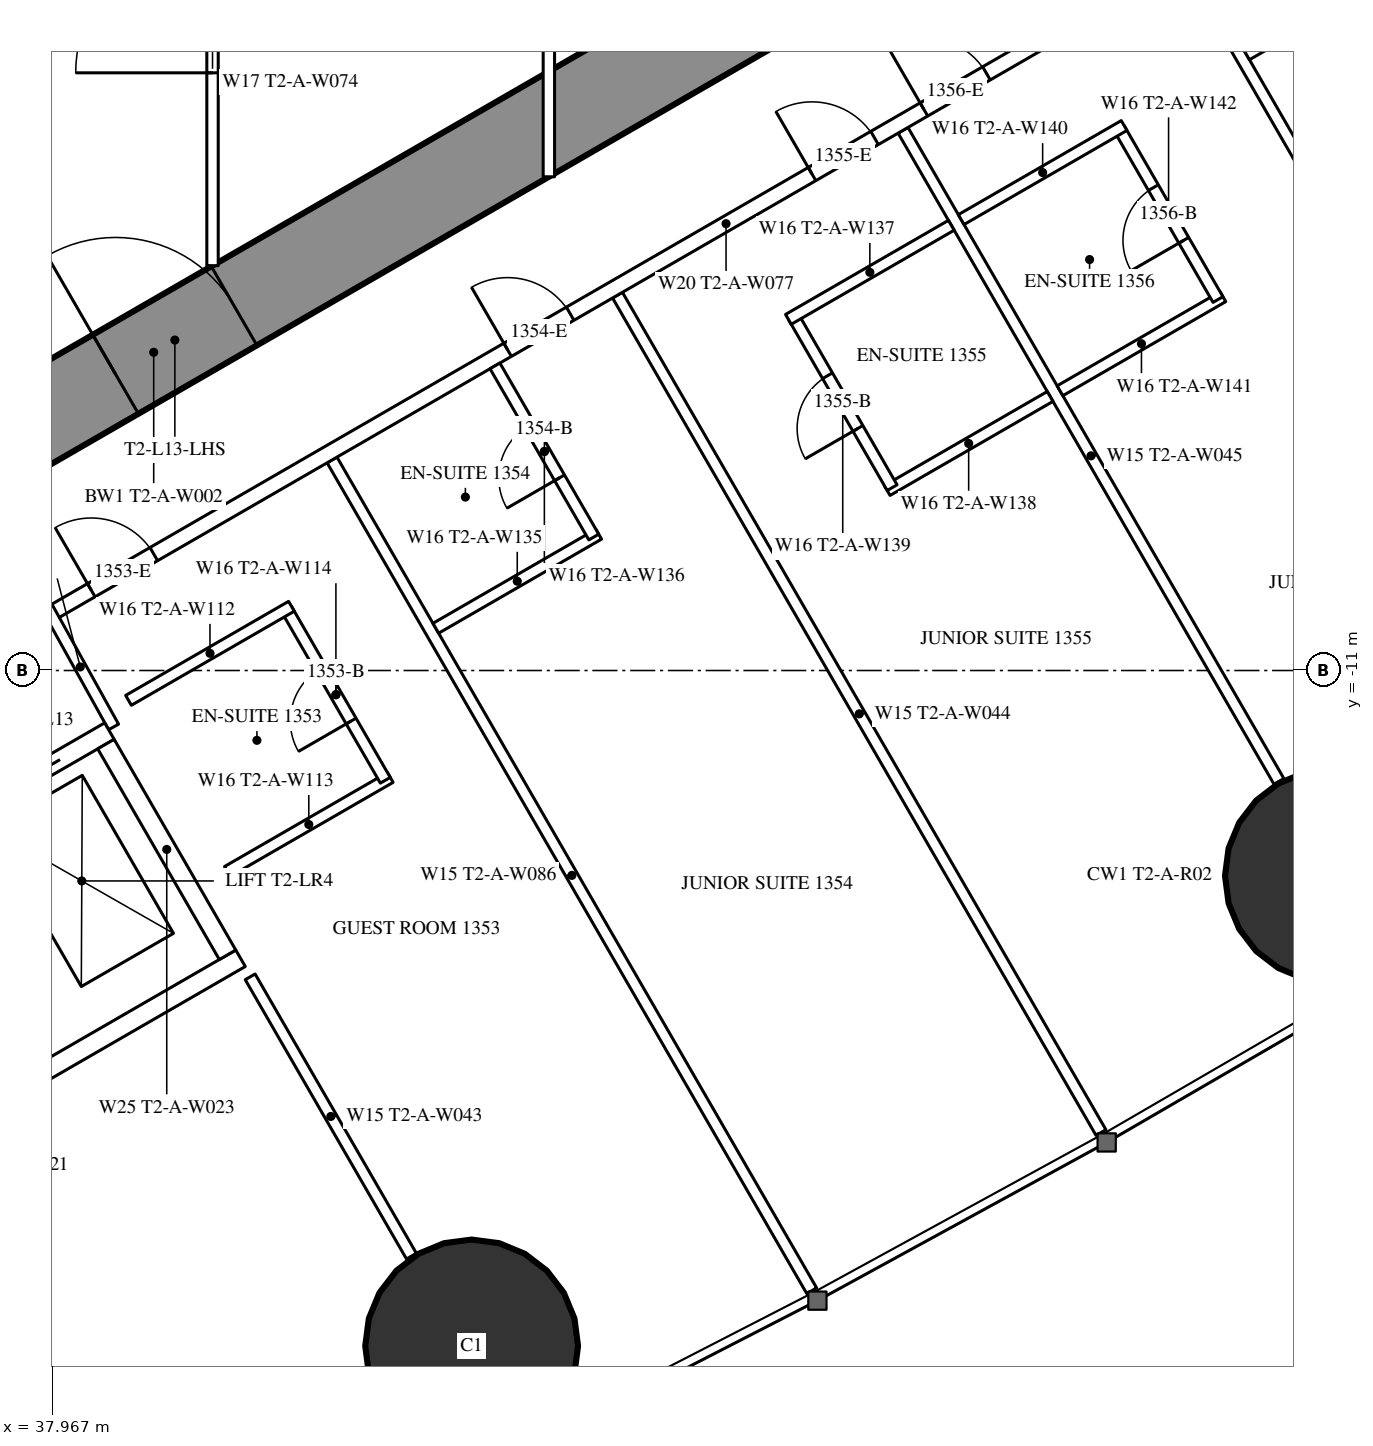
"""IFC4 building model, lengths in metres.
Left out: names, types, materials, properties, quantities, classifications, styles, units other than length and angle.
Written with IfcOpenShell. Run it as: python <this file> out.ifc"""

import sys

from ifc_helpers import new_model, si_unit, direction, frame, frame_2d, origin, origin_2d, place, context, subcontext, project, spatial, rectangle, hollow_circle, extrude, element, fill, save


model = new_model("IFC4")
c1 = context("Model", 3, precision=1e-05, world=origin(), true_north=direction((0.0, 1.0)))
c2 = subcontext(c1, "Body", "Model", "MODEL_VIEW")
j1 = project(units=[si_unit("LENGTHUNIT", "METRE"), si_unit("PLANEANGLEUNIT", "RADIAN")], contexts=[c1])
p1 = place(None, origin())
s1 = spatial("IfcSite", under=j1, at=p1, CompositionType="ELEMENT")
p2 = place(p1, origin())
s2 = spatial("IfcBuilding", under=s1, at=p2, CompositionType="ELEMENT")
p3 = place(p2, frame((0.0, 0.0, 53.0)))
s3 = spatial("IfcBuildingStorey", under=s2, at=p3, CompositionType="ELEMENT", Elevation=53.0)
for number, where, z_axis, x_axis in (
    (1, (43.484, -19.886, 0.0), (0.0, 0.0, 1.0), (1.0, 0.0, 0.0)),
    (2, (54.795, -13.701, 0.0), (0.0, 0.0, 1.0), (1.0, 0.0, 0.0)),
):
    element("IfcColumn", number, at=place(p3, frame(where, z_axis=z_axis, x_axis=x_axis)), inside=s3, PredefinedType="COLUMN", context=c2, shape_type="SweptSolid", body=[
        extrude(hollow_circle(Radius=1.4, WallThickness=0.12, at=origin_2d()), origin(), (0.0, 0.0, 1.0), 3.5),
    ])
p4 = place(p3, frame((27.2, -13.8, 0.0), z_axis=(0.0, 0.0, 1.0), x_axis=(0.866027159892, 0.499996958321, 0.0)))
e3 = element("IfcWall", 3, at=p4, inside=s3, PredefinedType="SHEAR", context=c2, shape_type="SweptSolid", body=[
    extrude(rectangle(XDim=27.947, YDim=1.2, at=frame_2d((13.973, 0.0))), origin(), (0.0, 0.0, 1.0), 3.5),
])
p5 = place(p4, frame((4.6, 0.0, 0.0)))
e4 = element("IfcOpeningElement", 4, at=p5, cuts=e3, PredefinedType="OPENING", context=c2, shape_type="SweptSolid", body=[
    extrude(rectangle(XDim=1.0, YDim=2.2, at=frame_2d((0.5, 1.1))), frame((0.0, 0.61, 0.0), z_axis=(0.0, -1.0, 0.0), x_axis=(1.0, 0.0, 0.0)), (0.0, 0.0, 1.0), 1.22),
])
p6 = place(p4, frame((13.395, 0.0, 0.0)))
e5 = element("IfcOpeningElement", 5, at=p6, cuts=e3, PredefinedType="OPENING", context=c2, shape_type="SweptSolid", body=[
    extrude(rectangle(XDim=1.8, YDim=2.2, at=frame_2d((0.9, 1.1))), frame((0.0, 0.61, 0.0), z_axis=(0.0, -1.0, 0.0), x_axis=(1.0, 0.0, 0.0)), (0.0, 0.0, 1.0), 1.22),
])
p7 = place(p3, frame((41.647, -8.23, 0.0), z_axis=(0.0, 0.0, 1.0), x_axis=(0.49998590462, -0.866033541603, 0.0)))
e6 = element("IfcWall", 6, at=p7, inside=s3, PredefinedType="PARTITIONING", context=c2, shape_type="SweptSolid", body=[
    extrude(rectangle(XDim=12.621, YDim=0.15, at=frame_2d((6.311, 0.0))), origin(), (0.0, 0.0, 1.0), 3.25),
])
p8 = place(p3, frame((45.403, -6.062, 0.0), z_axis=(0.0, 0.0, 1.0), x_axis=(0.500007077968, -0.866021317279, 0.0)))
e7 = element("IfcWall", 7, at=p8, inside=s3, PredefinedType="PARTITIONING", context=c2, shape_type="SweptSolid", body=[
    extrude(rectangle(XDim=12.721, YDim=0.15, at=frame_2d((6.361, 0.0))), origin(), (0.0, 0.0, 1.0), 3.25),
])
p9 = place(p3, frame((49.159, -3.893, 0.0), z_axis=(0.0, 0.0, 1.0), x_axis=(0.499998773722, -0.866026111775, 0.0)))
e8 = element("IfcWall", 8, at=p9, inside=s3, PredefinedType="PARTITIONING", context=c2, shape_type="SweptSolid", body=[
    extrude(rectangle(XDim=9.892, YDim=0.15, at=frame_2d((4.946, 0.0))), origin(), (0.0, 0.0, 1.0), 2.25),
])
p10 = place(p3, frame((52.915, -1.725, 0.0), z_axis=(0.0, 0.0, 1.0), x_axis=(0.499997163113, -0.866027041656, 0.0)))
e9 = element("IfcWall", 9, at=p10, inside=s3, PredefinedType="PARTITIONING", context=c2, shape_type="SweptSolid", body=[
    extrude(rectangle(XDim=12.591, YDim=0.15, at=frame_2d((6.295, 0.0))), origin(), (0.0, 0.0, 1.0), 3.25),
])
p11 = place(p3, frame((40.57, -15.03, 0.0), z_axis=(0.0, 0.0, 1.0), x_axis=(0.500012993597, -0.866017901798, 0.0)))
e10 = element("IfcWall", 10, at=p11, inside=s3, PredefinedType="PARTITIONING", context=c2, shape_type="SweptSolid", body=[
    extrude(rectangle(XDim=4.243, YDim=0.15, at=frame_2d((2.122, 0.0))), origin(), (0.0, 0.0, 1.0), 3.25),
])
p12 = place(p3, frame((37.96, -10.243, 0.0), z_axis=(0.0, 0.0, 1.0), x_axis=(0.866026429433, 0.499998223521, 0.0)))
e11 = element("IfcWall", 11, at=p12, inside=s3, PredefinedType="PARTITIONING", context=c2, shape_type="SweptSolid", body=[
    extrude(rectangle(XDim=20.487, YDim=0.2, at=frame_2d((10.243, 0.0))), origin(), (0.0, 0.0, 1.0), 3.25),
])
p13 = place(p12, frame((6.925, 0.0, 0.0)))
e12 = element("IfcOpeningElement", 12, at=p13, cuts=e11, PredefinedType="OPENING", context=c2, shape_type="SweptSolid", body=[
    extrude(rectangle(XDim=0.95, YDim=2.2, at=frame_2d((0.475, 1.1))), frame((0.0, 0.11, 0.0), z_axis=(0.0, -1.0, 0.0), x_axis=(1.0, 0.0, 0.0)), (0.0, 0.0, 1.0), 0.22),
])
p14 = place(p12, frame((11.549, 0.0, 0.0)))
e13 = element("IfcOpeningElement", 13, at=p14, cuts=e11, PredefinedType="OPENING", context=c2, shape_type="SweptSolid", body=[
    extrude(rectangle(XDim=0.95, YDim=2.2, at=frame_2d((0.475, 1.1))), frame((0.0, 0.11, 0.0), z_axis=(0.0, -1.0, 0.0), x_axis=(1.0, 0.0, 0.0)), (0.0, 0.0, 1.0), 0.22),
])
p15 = place(p12, frame((13.249, 0.0, 0.0)))
e14 = element("IfcOpeningElement", 14, at=p15, cuts=e11, PredefinedType="OPENING", context=c2, shape_type="SweptSolid", body=[
    extrude(rectangle(XDim=0.95, YDim=2.2, at=frame_2d((0.475, 1.1))), frame((0.0, 0.11, 0.0), z_axis=(0.0, -1.0, 0.0), x_axis=(1.0, 0.0, 0.0)), (0.0, 0.0, 1.0), 0.22),
])
p16 = place(p12, frame((17.585, 0.0, 0.0)))
e15 = element("IfcOpeningElement", 15, at=p16, cuts=e11, PredefinedType="OPENING", context=c2, shape_type="SweptSolid", body=[
    extrude(rectangle(XDim=0.95, YDim=2.2, at=frame_2d((0.475, 1.1))), frame((0.0, 0.11, 0.0), z_axis=(0.0, -1.0, 0.0), x_axis=(1.0, 0.0, 0.0)), (0.0, 0.0, 1.0), 0.22),
])
p17 = place(p12, frame((0.6, 0.0, 0.0)))
e16 = element("IfcOpeningElement", 16, at=p17, cuts=e11, PredefinedType="OPENING", context=c2, shape_type="SweptSolid", body=[
    extrude(rectangle(XDim=0.95, YDim=2.2, at=frame_2d((0.475, 1.1))), frame((0.0, 0.11, 0.0), z_axis=(0.0, -1.0, 0.0), x_axis=(1.0, 0.0, 0.0)), (0.0, 0.0, 1.0), 0.22),
])
p18 = place(p3, frame((38.773, -11.742, 0.0), z_axis=(0.0, 0.0, 1.0), x_axis=(-0.485528096672, 0.8742210632, 0.0)))
e17 = element("IfcWall", 17, at=p18, inside=s3, PredefinedType="PARTITIONING", context=c2, shape_type="SweptSolid", body=[
    extrude(rectangle(XDim=1.805, YDim=0.15, at=frame_2d((0.903, 0.0))), origin(), (0.0, 0.0, 1.0), 3.25),
])
p19 = place(p3, frame((43.012, -10.444, 0.0), z_axis=(0.0, 0.0, 1.0), x_axis=(0.866031185235, 0.4999899861, 0.0)))
e18 = element("IfcWall", 18, at=p19, inside=s3, PredefinedType="PARTITIONING", context=c2, shape_type="SweptSolid", body=[
    extrude(rectangle(XDim=2.475, YDim=0.15, at=frame_2d((1.238, 0.0))), origin(), (0.0, 0.0, 1.0), 3.25),
])
p20 = place(p3, frame((43.791, -6.993, 0.0), z_axis=(0.0, 0.0, 1.0), x_axis=(0.500047596559, -0.865997922154, 0.0)))
e19 = element("IfcWall", 19, at=p20, inside=s3, PredefinedType="PARTITIONING", context=c2, shape_type="SweptSolid", body=[
    extrude(rectangle(XDim=2.6, YDim=0.15, at=frame_2d((1.3, 0.0))), origin(), (0.0, 0.0, 1.0), 3.25),
])
p21 = place(p20, frame((0.9, 0.0, 0.0)))
e20 = element("IfcOpeningElement", 20, at=p21, cuts=e19, PredefinedType="OPENING", context=c2, shape_type="SweptSolid", body=[
    extrude(rectangle(XDim=0.8, YDim=2.2, at=frame_2d((0.4, 1.1))), frame((0.0, 0.085, 0.0), z_axis=(0.0, -1.0, 0.0), x_axis=(1.0, 0.0, 0.0)), (0.0, 0.0, 1.0), 0.17),
])
p22 = place(p3, frame((48.951, -8.632, 0.0), z_axis=(0.0, 0.0, 1.0), x_axis=(0.866006523861, 0.500032699561, 0.0)))
e21 = element("IfcWall", 21, at=p22, inside=s3, PredefinedType="PARTITIONING", context=c2, shape_type="SweptSolid", body=[
    extrude(rectangle(XDim=2.475, YDim=0.15, at=frame_2d((1.237, 0.0))), origin(), (0.0, 0.0, 1.0), 3.25),
])
p23 = place(p3, frame((47.716, -6.343, 0.0), z_axis=(0.0, 0.0, 1.0), x_axis=(0.500006934395, -0.866021400173, 0.0)))
e22 = element("IfcWall", 22, at=p23, inside=s3, PredefinedType="PARTITIONING", context=c2, shape_type="SweptSolid", body=[
    extrude(rectangle(XDim=2.6, YDim=0.15, at=frame_2d((1.3, 0.0))), origin(), (0.0, 0.0, 1.0), 3.25),
])
p24 = place(p23, frame((0.9, 0.0, 0.0)))
e23 = element("IfcOpeningElement", 23, at=p24, cuts=e22, PredefinedType="OPENING", context=c2, shape_type="SweptSolid", body=[
    extrude(rectangle(XDim=0.8, YDim=2.2, at=frame_2d((0.4, 1.1))), frame((0.0, 0.085, 0.0), z_axis=(0.0, -1.0, 0.0), x_axis=(1.0, 0.0, 0.0)), (0.0, 0.0, 1.0), 0.17),
])
for number, where, z_axis, x_axis in (
    (24, (47.651, -6.38, 0.0), (0.0, 0.0, 1.0), (0.866, 0.5, 0.0)),
    (25, (51.224, -7.32, 0.0), (0.0, 0.0, 1.0), (0.866, 0.5, 0.0)),
):
    element("IfcWall", number, at=place(p3, frame(where, z_axis=z_axis, x_axis=x_axis)), inside=s3, PredefinedType="PARTITIONING", context=c2, shape_type="SweptSolid", body=[
        extrude(rectangle(XDim=2.475, YDim=0.15, at=frame_2d((1.238, 0.0))), origin(), (0.0, 0.0, 1.0), 3.25),
    ])
p25 = place(p3, frame((52.003, -3.868, 0.0), z_axis=(0.0, 0.0, 1.0), x_axis=(0.500047596559, -0.865997922154, 0.0)))
e26 = element("IfcWall", 26, at=p25, inside=s3, PredefinedType="PARTITIONING", context=c2, shape_type="SweptSolid", body=[
    extrude(rectangle(XDim=2.6, YDim=0.15, at=frame_2d((1.3, 0.0))), origin(), (0.0, 0.0, 1.0), 3.25),
])
p26 = place(p25, frame((0.9, 0.0, 0.0)))
e27 = element("IfcOpeningElement", 27, at=p26, cuts=e26, PredefinedType="OPENING", context=c2, shape_type="SweptSolid", body=[
    extrude(rectangle(XDim=0.8, YDim=2.2, at=frame_2d((0.4, 1.1))), frame((0.0, 0.085, 0.0), z_axis=(0.0, -1.0, 0.0), x_axis=(1.0, 0.0, 0.0)), (0.0, 0.0, 1.0), 0.17),
])
for number, where, z_axis, x_axis in (
    (28, (49.925, -5.068, 0.0), (0.0, 0.0, 1.0), (0.866, 0.5, 0.0)),
    (29, (53.68, -2.9, 0.0), (0.0, 0.0, 1.0), (0.866, 0.5, 0.0)),
):
    element("IfcWall", number, at=place(p3, frame(where, z_axis=z_axis, x_axis=x_axis)), inside=s3, PredefinedType="PARTITIONING", context=c2, shape_type="SweptSolid", body=[
        extrude(rectangle(XDim=2.475, YDim=0.15, at=frame_2d((1.237, 0.0))), origin(), (0.0, 0.0, 1.0), 3.25),
    ])
p27 = place(p3, frame((40.27, -13.644, 0.0), z_axis=(0.0, 0.0, 1.0), x_axis=(0.866031185235, 0.4999899861, 0.0)))
e30 = element("IfcWall", 30, at=p27, inside=s3, PredefinedType="PARTITIONING", context=c2, shape_type="SweptSolid", body=[
    extrude(rectangle(XDim=2.475, YDim=0.15, at=frame_2d((1.238, 0.0))), origin(), (0.0, 0.0, 1.0), 3.25),
])
p28 = place(p3, frame((41.048, -10.193, 0.0), z_axis=(0.0, 0.0, 1.0), x_axis=(0.500047596559, -0.865997922154, 0.0)))
e31 = element("IfcWall", 31, at=p28, inside=s3, PredefinedType="PARTITIONING", context=c2, shape_type="SweptSolid", body=[
    extrude(rectangle(XDim=2.6, YDim=0.15, at=frame_2d((1.3, 0.0))), origin(), (0.0, 0.0, 1.0), 3.25),
])
p29 = place(p28, frame((0.9, 0.0, 0.0)))
e32 = element("IfcOpeningElement", 32, at=p29, cuts=e31, PredefinedType="OPENING", context=c2, shape_type="SweptSolid", body=[
    extrude(rectangle(XDim=0.8, YDim=2.2, at=frame_2d((0.4, 1.1))), frame((0.0, 0.085, 0.0), z_axis=(0.0, -1.0, 0.0), x_axis=(1.0, 0.0, 0.0)), (0.0, 0.0, 1.0), 0.17),
])
p30 = place(p3, frame((38.97, -11.393, 0.0), z_axis=(0.0, 0.0, 1.0), x_axis=(0.866031185235, 0.4999899861, 0.0)))
e33 = element("IfcWall", 33, at=p30, inside=s3, PredefinedType="PARTITIONING", context=c2, shape_type="SweptSolid", body=[
    extrude(rectangle(XDim=2.475, YDim=0.15, at=frame_2d((1.238, 0.0))), origin(), (0.0, 0.0, 1.0), 3.25),
])
p31 = place(p3, frame((40.075, -5.674, 0.0), z_axis=(0.0, 0.0, 1.0), x_axis=(0.0, 1.0, 0.0)))
e34 = element("IfcWall", 34, at=p31, inside=s3, PredefinedType="PARTITIONING", context=c2, shape_type="SweptSolid", body=[
    extrude(rectangle(XDim=6.874, YDim=0.15, at=frame_2d((3.437, 0.0))), origin(), (0.0, 0.0, 1.0), 3.25),
])
p32 = place(p31, frame((2.537, 0.0, 0.0)))
e35 = element("IfcOpeningElement", 35, at=p32, cuts=e34, PredefinedType="OPENING", context=c2, shape_type="SweptSolid", body=[
    extrude(rectangle(XDim=1.8, YDim=2.2, at=frame_2d((0.9, 1.1))), frame((0.0, 0.085, 0.0), z_axis=(0.0, -1.0, 0.0), x_axis=(1.0, 0.0, 0.0)), (0.0, 0.0, 1.0), 0.17),
])
p33 = place(p3, frame((44.5, -4.505, 0.0), z_axis=(0.0, 0.0, 1.0), x_axis=(0.0, 1.0, 0.0)))
e36 = element("IfcWall", 36, at=p33, inside=s3, PredefinedType="PARTITIONING", context=c2, shape_type="SweptSolid", body=[
    extrude(rectangle(XDim=9.009, YDim=0.15, at=frame_2d((4.505, 0.0))), origin(), (0.0, 0.0, 1.0), 2.45),
])
p34 = place(p33, frame((1.752, 0.0, 0.0)))
e37 = element("IfcOpeningElement", 37, at=p34, cuts=e36, PredefinedType="OPENING", context=c2, shape_type="SweptSolid", body=[
    extrude(rectangle(XDim=1.0, YDim=2.2, at=frame_2d((0.5, 1.1))), frame((0.0, 0.085, 0.0), z_axis=(0.0, -1.0, 0.0), x_axis=(1.0, 0.0, 0.0)), (0.0, 0.0, 1.0), 0.17),
])
p35 = place(p33, frame((6.257, 0.0, 0.0)))
e38 = element("IfcOpeningElement", 38, at=p35, cuts=e36, PredefinedType="OPENING", context=c2, shape_type="SweptSolid", body=[
    extrude(rectangle(XDim=1.0, YDim=2.2, at=frame_2d((0.5, 1.1))), frame((0.0, 0.085, 0.0), z_axis=(0.0, -1.0, 0.0), x_axis=(1.0, 0.0, 0.0)), (0.0, 0.0, 1.0), 0.17),
])
p36 = place(p3, frame((31.271, -16.097, 0.0), z_axis=(0.0, 0.0, 1.0), x_axis=(0.86604045752, 0.499973925258, 0.0)))
e39 = element("IfcWall", 39, at=p36, inside=s3, PredefinedType="PARTITIONING", context=c2, shape_type="SweptSolid", body=[
    extrude(rectangle(XDim=8.6, YDim=0.25, at=frame_2d((4.3, 0.0))), origin(), (0.0, 0.0, 1.0), 3.25),
])
p37 = place(p36, frame((0.75, 0.0, 0.0)))
e40 = element("IfcOpeningElement", 40, at=p37, cuts=e39, PredefinedType="OPENING", context=c2, shape_type="SweptSolid", body=[
    extrude(rectangle(XDim=1.1, YDim=2.2, at=frame_2d((0.55, 1.1))), frame((0.0, 0.135, 0.0), z_axis=(0.0, -1.0, 0.0), x_axis=(1.0, 0.0, 0.0)), (0.0, 0.0, 1.0), 0.27),
])
p38 = place(p36, frame((2.75, 0.0, 0.0)))
e41 = element("IfcOpeningElement", 41, at=p38, cuts=e39, PredefinedType="OPENING", context=c2, shape_type="SweptSolid", body=[
    extrude(rectangle(XDim=1.1, YDim=2.2, at=frame_2d((0.55, 1.1))), frame((0.0, 0.135, 0.0), z_axis=(0.0, -1.0, 0.0), x_axis=(1.0, 0.0, 0.0)), (0.0, 0.0, 1.0), 0.27),
])
p39 = place(p36, frame((4.75, 0.0, 0.0)))
e42 = element("IfcOpeningElement", 42, at=p39, cuts=e39, PredefinedType="OPENING", context=c2, shape_type="SweptSolid", body=[
    extrude(rectangle(XDim=1.1, YDim=2.2, at=frame_2d((0.55, 1.1))), frame((0.0, 0.135, 0.0), z_axis=(0.0, -1.0, 0.0), x_axis=(1.0, 0.0, 0.0)), (0.0, 0.0, 1.0), 0.27),
])
p40 = place(p36, frame((6.75, 0.0, 0.0)))
e43 = element("IfcOpeningElement", 43, at=p40, cuts=e39, PredefinedType="OPENING", context=c2, shape_type="SweptSolid", body=[
    extrude(rectangle(XDim=1.1, YDim=2.2, at=frame_2d((0.55, 1.1))), frame((0.0, 0.135, 0.0), z_axis=(0.0, -1.0, 0.0), x_axis=(1.0, 0.0, 0.0)), (0.0, 0.0, 1.0), 0.27),
])
p41 = place(p3, frame((32.996, -19.086, 0.0), z_axis=(0.0, 0.0, 1.0), x_axis=(0.866028165386, 0.499995216735, 0.0)))
e44 = element("IfcWall", 44, at=p41, inside=s3, PredefinedType="PARTITIONING", context=c2, shape_type="SweptSolid", body=[
    extrude(rectangle(XDim=8.6, YDim=0.25, at=frame_2d((4.3, 0.0))), origin(), (0.0, 0.0, 1.0), 3.25),
])
p42 = place(p3, frame((38.673, -11.968, 0.0), z_axis=(0.0, 0.0, 1.0), x_axis=(0.499929347863, -0.866066190972, 0.0)))
e45 = element("IfcWall", 45, at=p42, inside=s3, PredefinedType="PARTITIONING", context=c2, shape_type="SweptSolid", body=[
    extrude(rectangle(XDim=3.201, YDim=0.25, at=frame_2d((1.6, 0.0))), origin(), (0.0, 0.0, 1.0), 3.25),
])
p43 = place(p21, origin())
e46 = element("IfcDoor", 46, at=p43, inside=s3, OperationType="SINGLE_SWING_RIGHT", PredefinedType="DOOR", context=c2, shape_type="SweptSolid", body=[
    extrude(rectangle(XDim=0.8, YDim=2.2, at=frame_2d((0.4, 1.1))), frame((0.0, 0.025, 0.0), z_axis=(0.0, -1.0, 0.0), x_axis=(1.0, 0.0, 0.0)), (0.0, 0.0, 1.0), 0.05),
])
fill(e20, e46)
p44 = place(p13, origin())
e47 = element("IfcDoor", 47, at=p44, inside=s3, OperationType="SINGLE_SWING_LEFT", PredefinedType="DOOR", context=c2, shape_type="SweptSolid", body=[
    extrude(rectangle(XDim=0.95, YDim=2.2, at=frame_2d((0.475, 1.1))), frame((0.0, 0.025, 0.0), z_axis=(0.0, -1.0, 0.0), x_axis=(1.0, 0.0, 0.0)), (0.0, 0.0, 1.0), 0.05),
])
fill(e12, e47)
p45 = place(p24, origin())
e48 = element("IfcDoor", 48, at=p45, inside=s3, OperationType="SINGLE_SWING_RIGHT", PredefinedType="DOOR", context=c2, shape_type="SweptSolid", body=[
    extrude(rectangle(XDim=0.8, YDim=2.2, at=frame_2d((0.4, 1.1))), frame((0.0, 0.025, 0.0), z_axis=(0.0, -1.0, 0.0), x_axis=(1.0, 0.0, 0.0)), (0.0, 0.0, 1.0), 0.05),
])
fill(e23, e48)
p46 = place(p14, origin())
e49 = element("IfcDoor", 49, at=p46, inside=s3, OperationType="SINGLE_SWING_LEFT", PredefinedType="DOOR", context=c2, shape_type="SweptSolid", body=[
    extrude(rectangle(XDim=0.95, YDim=2.2, at=frame_2d((0.475, 1.1))), frame((0.0, 0.025, 0.0), z_axis=(0.0, -1.0, 0.0), x_axis=(1.0, 0.0, 0.0)), (0.0, 0.0, 1.0), 0.05),
])
fill(e13, e49)
p47 = place(p26, origin())
e50 = element("IfcDoor", 50, at=p47, inside=s3, OperationType="SINGLE_SWING_RIGHT", PredefinedType="DOOR", context=c2, shape_type="SweptSolid", body=[
    extrude(rectangle(XDim=0.8, YDim=2.2, at=frame_2d((0.4, 1.1))), frame((0.0, 0.025, 0.0), z_axis=(0.0, -1.0, 0.0), x_axis=(1.0, 0.0, 0.0)), (0.0, 0.0, 1.0), 0.05),
])
fill(e27, e50)
p48 = place(p15, origin())
e51 = element("IfcDoor", 51, at=p48, inside=s3, OperationType="SINGLE_SWING_LEFT", PredefinedType="DOOR", context=c2, shape_type="SweptSolid", body=[
    extrude(rectangle(XDim=0.95, YDim=2.2, at=frame_2d((0.475, 1.1))), frame((0.0, 0.025, 0.0), z_axis=(0.0, -1.0, 0.0), x_axis=(1.0, 0.0, 0.0)), (0.0, 0.0, 1.0), 0.05),
])
fill(e14, e51)
p49 = place(p29, origin())
e52 = element("IfcDoor", 52, at=p49, inside=s3, OperationType="SINGLE_SWING_RIGHT", PredefinedType="DOOR", context=c2, shape_type="SweptSolid", body=[
    extrude(rectangle(XDim=0.8, YDim=2.2, at=frame_2d((0.4, 1.1))), frame((0.0, 0.025, 0.0), z_axis=(0.0, -1.0, 0.0), x_axis=(1.0, 0.0, 0.0)), (0.0, 0.0, 1.0), 0.05),
])
fill(e32, e52)
p50 = place(p17, origin())
e53 = element("IfcDoor", 53, at=p50, inside=s3, OperationType="SINGLE_SWING_LEFT", PredefinedType="DOOR", context=c2, shape_type="SweptSolid", body=[
    extrude(rectangle(XDim=0.95, YDim=2.2, at=frame_2d((0.475, 1.1))), frame((0.0, 0.025, 0.0), z_axis=(0.0, -1.0, 0.0), x_axis=(1.0, 0.0, 0.0)), (0.0, 0.0, 1.0), 0.05),
])
fill(e16, e53)
p51 = place(p32, origin())
e54 = element("IfcDoor", 54, at=p51, inside=s3, OperationType="DOUBLE_DOOR_SINGLE_SWING", PredefinedType="DOOR", context=c2, shape_type="SweptSolid", body=[
    extrude(rectangle(XDim=1.8, YDim=2.2, at=frame_2d((0.9, 1.1))), frame((0.0, 0.025, 0.0), z_axis=(0.0, -1.0, 0.0), x_axis=(1.0, 0.0, 0.0)), (0.0, 0.0, 1.0), 0.05),
])
fill(e35, e54)
p52 = place(p6, origin())
e55 = element("IfcDoor", 55, at=p52, inside=s3, OperationType="DOUBLE_DOOR_SINGLE_SWING", PredefinedType="DOOR", context=c2, shape_type="SweptSolid", body=[
    extrude(rectangle(XDim=1.8, YDim=2.2, at=frame_2d((0.9, 1.1))), frame((0.0, 0.025, 0.0), z_axis=(0.0, -1.0, 0.0), x_axis=(1.0, 0.0, 0.0)), (0.0, 0.0, 1.0), 0.05),
])
fill(e5, e55)
p53 = place(p40, origin())
e56 = element("IfcDoor", 56, at=p53, inside=s3, OperationType="DOUBLE_DOOR_SLIDING", PredefinedType="USERDEFINED", context=c2, shape_type="SweptSolid", body=[
    extrude(rectangle(XDim=1.1, YDim=2.2, at=frame_2d((0.55, 1.1))), frame((0.0, 0.025, 0.0), z_axis=(0.0, -1.0, 0.0), x_axis=(1.0, 0.0, 0.0)), (0.0, 0.0, 1.0), 0.05),
])
fill(e43, e56)
save(model, sys.argv[1])
